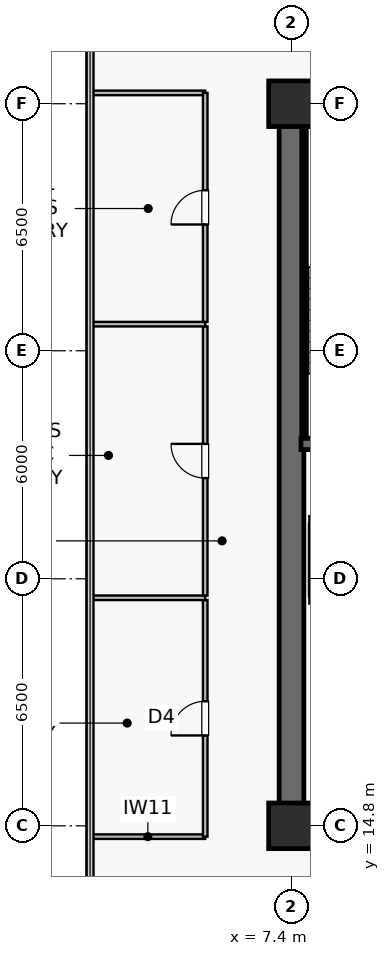
"""IFC4 building model, lengths in metres.
Left out: names, types, materials, properties, quantities, classifications, styles, units other than length and angle.
Written with IfcOpenShell. Run it as: python <this file> out.ifc"""

import sys

from ifc_helpers import new_model, si_unit, direction, frame, frame_2d, origin, origin_2d, place, context, subcontext, project, spatial, rectangle, extrude, source, transform, mapped, element, fill, save


model = new_model("IFC4")
c1 = context("Model", 3, precision=1e-05, world=origin(), true_north=direction((0.0, 1.0)))
c2 = subcontext(c1, "Body", "Model", "MODEL_VIEW")
j1 = project(units=[si_unit("LENGTHUNIT", "METRE"), si_unit("PLANEANGLEUNIT", "RADIAN")], contexts=[c1])
p1 = place(None, origin())
s1 = spatial("IfcSite", under=j1, at=p1, CompositionType="ELEMENT")
p2 = place(p1, origin())
s2 = spatial("IfcBuilding", under=s1, at=p2, CompositionType="ELEMENT")
p3 = place(p2, frame((0.0, 0.0, 109.2)))
s3 = spatial("IfcBuildingStorey", under=s2, at=p3, CompositionType="ELEMENT", Elevation=109.2)
p4 = place(p3, frame((7.075, 14.8, 0.0), z_axis=(0.0, 0.0, 1.0), x_axis=(1.0, 0.0, 0.0)))
e1 = element("IfcWall", 1, at=p4, inside=s3, PredefinedType="SHEAR", context=c2, shape_type="SweptSolid", body=[
    extrude(rectangle(XDim=15.45, YDim=0.65, at=frame_2d((7.725, 0.0))), origin(), (0.0, 0.0, 1.0), 3.79),
])
p5 = place(p3, frame((7.075, 33.8, 0.0), z_axis=(0.0, 0.0, 1.0), x_axis=(1.0, 0.0, 0.0)))
e2 = element("IfcWall", 2, at=p5, inside=s3, PredefinedType="SHEAR", context=c2, shape_type="SweptSolid", body=[
    extrude(rectangle(XDim=15.45, YDim=0.65, at=frame_2d((7.725, 0.0))), origin(), (0.0, 0.0, 1.0), 3.79),
])
p6 = place(p5, frame((8.375, 0.0, 0.0)))
e3 = element("IfcOpeningElement", 3, at=p6, cuts=e2, PredefinedType="OPENING", context=c2, shape_type="SweptSolid", body=[
    extrude(rectangle(XDim=0.95, YDim=2.15, at=frame_2d((0.475, 1.075))), frame((0.0, 0.335, 0.0), z_axis=(0.0, -1.0, 0.0), x_axis=(1.0, 0.0, 0.0)), (0.0, 0.0, 1.0), 0.67),
])
p7 = place(p5, frame((11.915, 0.0, 0.0)))
e4 = element("IfcOpeningElement", 4, at=p7, cuts=e2, PredefinedType="OPENING", context=c2, shape_type="SweptSolid", body=[
    extrude(rectangle(XDim=0.95, YDim=2.15, at=frame_2d((0.475, 1.075))), frame((0.0, 0.335, 0.0), z_axis=(0.0, -1.0, 0.0), x_axis=(1.0, 0.0, 0.0)), (0.0, 0.0, 1.0), 0.67),
])
p8 = place(p3, frame((7.4, 15.125, 0.0), z_axis=(0.0, 0.0, 1.0), x_axis=(0.0, 1.0, 0.0)))
e5 = element("IfcWall", 5, at=p8, inside=s3, PredefinedType="SHEAR", context=c2, shape_type="SweptSolid", body=[
    extrude(rectangle(XDim=18.35, YDim=0.65, at=frame_2d((9.175, 0.0))), origin(), (0.0, 0.0, 1.0), 3.79),
])
p9 = place(p3, frame((7.65, 24.85, 0.0), z_axis=(0.0, 0.0, 1.0), x_axis=(1.0, 0.0, 0.0)))
e6 = element("IfcWall", 6, at=p9, inside=s3, PredefinedType="SHEAR", context=c2, shape_type="SweptSolid", body=[
    extrude(rectangle(XDim=3.8, YDim=0.3, at=frame_2d((1.9, 0.0))), origin(), (0.0, 0.0, 1.0), 3.79),
])
p10 = place(p3, frame((7.73, 33.4, 0.0), z_axis=(0.0, 0.0, 1.0), x_axis=(1.0, 0.0, 0.0)))
e7 = element("IfcWall", 7, at=p10, inside=s3, PredefinedType="SOLIDWALL", context=c2, shape_type="SweptSolid", body=[
    extrude(rectangle(XDim=3.72, YDim=0.12, at=frame_2d((1.86, 0.0))), origin(), (0.0, 0.0, 1.0), 3.79),
])
p11 = place(p3, frame((7.73, 25.0, 0.0), z_axis=(0.0, 0.0, 1.0), x_axis=(0.0, 1.0, 0.0)))
e8 = element("IfcWall", 8, at=p11, inside=s3, PredefinedType="SOLIDWALL", context=c2, shape_type="SweptSolid", body=[
    extrude(rectangle(XDim=8.32, YDim=0.12, at=frame_2d((4.16, 0.0))), origin(), (0.0, 0.0, 1.0), 3.79),
])
m1 = source(origin(), c2, "Body", "SweptSolid", [
    extrude(rectangle(XDim=1.2, YDim=1.2, at=origin_2d()), origin(), (0.0, 0.0, 1.0), 4.1),
])
for number, where, z_axis, x_axis in (
    (9, (7.4, 14.8, 0.0), (0.0, 0.0, 1.0), (1.0, 0.0, 0.0)),
    (10, (7.4, 33.8, 0.0), (0.0, 0.0, 1.0), (1.0, 0.0, 0.0)),
):
    element("IfcColumn", number, at=place(p3, frame(where, z_axis=z_axis, x_axis=x_axis)), inside=s3, PredefinedType="COLUMN", context=c2, shape_type="MappedRepresentation", body=[
        mapped(m1, transform((0.0, 0.0, 0.0), scale=1.0)),
    ])
for number, where, z_axis, x_axis in (
    (11, (7.87, 20.75, 0.0), (0.0, 0.0, 1.0), (1.0, 0.0, 0.0)),
    (12, (7.87, 22.85, 0.0), (0.0, 0.0, 1.0), (1.0, 0.0, 0.0)),
):
    element("IfcWall", number, at=place(p3, frame(where, z_axis=z_axis, x_axis=x_axis)), inside=s3, PredefinedType="SOLIDWALL", context=c2, shape_type="SweptSolid", body=[
        extrude(rectangle(XDim=2.26, YDim=0.2, at=frame_2d((1.13, 0.0))), origin(), (0.0, 0.0, 1.0), 3.79),
    ])
p12 = place(p3, frame((7.95, 20.85, 0.0), z_axis=(0.0, 0.0, 1.0), x_axis=(0.0, 1.0, 0.0)))
e13 = element("IfcWall", 13, at=p12, inside=s3, PredefinedType="SOLIDWALL", context=c2, shape_type="SweptSolid", body=[
    extrude(rectangle(XDim=1.9, YDim=0.18, at=frame_2d((0.95, 0.0))), origin(), (0.0, 0.0, 1.0), 3.79),
])
for number, where, z_axis, x_axis in (
    (14, (2.11, 14.515, 0.0), (0.0, 0.0, 1.0), (1.0, 0.0, 0.0)),
    (15, (2.11, 34.085, 0.0), (0.0, 0.0, 1.0), (1.0, 0.0, 0.0)),
):
    element("IfcWall", number, at=place(p3, frame(where, z_axis=z_axis, x_axis=x_axis)), inside=s3, PredefinedType="PARTITIONING", context=c2, shape_type="SweptSolid", body=[
        extrude(rectangle(XDim=3.02, YDim=0.12, at=frame_2d((1.51, 0.0))), origin(), (0.0, 0.0, 1.0), 3.79),
    ])
p13 = place(p3, frame((5.13, 14.515, 0.0), z_axis=(0.0, 0.0, 1.0), x_axis=(0.0, 1.0, 0.0)))
e16 = element("IfcWall", 16, at=p13, inside=s3, PredefinedType="PARTITIONING", context=c2, shape_type="SweptSolid", body=[
    extrude(rectangle(XDim=6.225, YDim=0.12, at=frame_2d((3.113, 0.0))), origin(), (0.0, 0.0, 1.0), 3.79),
])
p14 = place(p13, frame((2.663, 0.0, 0.0)))
e17 = element("IfcOpeningElement", 17, at=p14, cuts=e16, PredefinedType="OPENING", context=c2, shape_type="SweptSolid", body=[
    extrude(rectangle(XDim=0.9, YDim=2.1, at=frame_2d((0.45, 1.05))), frame((0.0, 0.07, 0.0), z_axis=(0.0, -1.0, 0.0), x_axis=(1.0, 0.0, 0.0)), (0.0, 0.0, 1.0), 0.14),
])
p15 = place(p3, frame((2.11, 20.8, 0.0), z_axis=(0.0, 0.0, 1.0), x_axis=(1.0, 0.0, 0.0)))
e18 = element("IfcWall", 18, at=p15, inside=s3, PredefinedType="PARTITIONING", context=c2, shape_type="SweptSolid", body=[
    extrude(rectangle(XDim=3.02, YDim=0.12, at=frame_2d((1.51, 0.0))), origin(), (0.0, 0.0, 1.0), 3.79),
])
p16 = place(p3, frame((5.13, 20.86, 0.0), z_axis=(0.0, 0.0, 1.0), x_axis=(0.0, 1.0, 0.0)))
e19 = element("IfcWall", 19, at=p16, inside=s3, PredefinedType="PARTITIONING", context=c2, shape_type="SweptSolid", body=[
    extrude(rectangle(XDim=7.08, YDim=0.12, at=frame_2d((3.54, 0.0))), origin(), (0.0, 0.0, 1.0), 3.79),
])
p17 = place(p16, frame((3.09, 0.0, 0.0)))
e20 = element("IfcOpeningElement", 20, at=p17, cuts=e19, PredefinedType="OPENING", context=c2, shape_type="SweptSolid", body=[
    extrude(rectangle(XDim=0.9, YDim=2.1, at=frame_2d((0.45, 1.05))), frame((0.0, 0.07, 0.0), z_axis=(0.0, -1.0, 0.0), x_axis=(1.0, 0.0, 0.0)), (0.0, 0.0, 1.0), 0.14),
])
p18 = place(p3, frame((2.11, 28.0, 0.0), z_axis=(0.0, 0.0, 1.0), x_axis=(1.0, 0.0, 0.0)))
e21 = element("IfcWall", 21, at=p18, inside=s3, PredefinedType="PARTITIONING", context=c2, shape_type="SweptSolid", body=[
    extrude(rectangle(XDim=3.02, YDim=0.12, at=frame_2d((1.51, 0.0))), origin(), (0.0, 0.0, 1.0), 3.79),
])
p19 = place(p3, frame((5.13, 28.06, 0.0), z_axis=(0.0, 0.0, 1.0), x_axis=(0.0, 1.0, 0.0)))
e22 = element("IfcWall", 22, at=p19, inside=s3, PredefinedType="PARTITIONING", context=c2, shape_type="SweptSolid", body=[
    extrude(rectangle(XDim=6.025, YDim=0.12, at=frame_2d((3.012, 0.0))), origin(), (0.0, 0.0, 1.0), 3.79),
])
p20 = place(p19, frame((2.562, 0.0, 0.0)))
e23 = element("IfcOpeningElement", 23, at=p20, cuts=e22, PredefinedType="OPENING", context=c2, shape_type="SweptSolid", body=[
    extrude(rectangle(XDim=0.9, YDim=2.1, at=frame_2d((0.45, 1.05))), frame((0.0, 0.07, 0.0), z_axis=(0.0, -1.0, 0.0), x_axis=(1.0, 0.0, 0.0)), (0.0, 0.0, 1.0), 0.14),
])
m2 = source(origin(), c2, "Body", "SweptSolid", [
    extrude(rectangle(XDim=0.9, YDim=2.1, at=frame_2d((0.45, 1.05))), frame((0.0, 0.025, 0.0), z_axis=(0.0, -1.0, 0.0), x_axis=(1.0, 0.0, 0.0)), (0.0, 0.0, 1.0), 0.05),
])
p21 = place(p14, origin())
e24 = element("IfcDoor", 24, at=p21, inside=s3, OperationType="SINGLE_SWING_LEFT", PredefinedType="DOOR", context=c2, shape_type="MappedRepresentation", body=[
    mapped(m2, transform((0.0, 0.0, 0.0), scale=1.0)),
])
fill(e17, e24)
p22 = place(p17, origin())
e25 = element("IfcDoor", 25, at=p22, inside=s3, OperationType="SINGLE_SWING_RIGHT", PredefinedType="DOOR", context=c2, shape_type="MappedRepresentation", body=[
    mapped(m2, transform((0.0, 0.0, 0.0), scale=1.0)),
])
fill(e20, e25)
p23 = place(p20, origin())
e26 = element("IfcDoor", 26, at=p23, inside=s3, OperationType="SINGLE_SWING_LEFT", PredefinedType="DOOR", context=c2, shape_type="MappedRepresentation", body=[
    mapped(m2, transform((0.0, 0.0, 0.0), scale=1.0)),
])
fill(e23, e26)
save(model, sys.argv[1])
